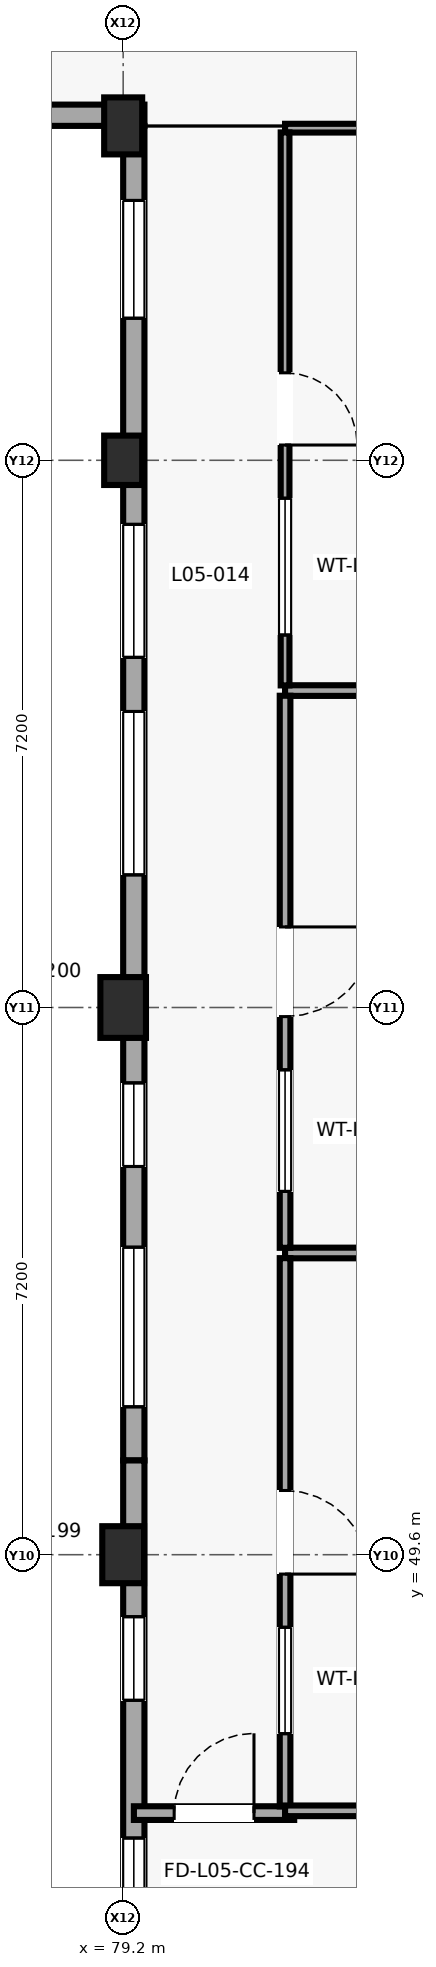
"""IFC4 building model, lengths in metres.
Left out: names, types, materials, properties, quantities, classifications, styles, units other than length and angle.
Written with IfcOpenShell. Run it as: python <this file> out.ifc"""

import sys

from ifc_helpers import new_model, si_unit, direction, frame, frame_2d, origin, origin_2d, place, context, subcontext, project, spatial, polyline, rectangle, outline, extrude, element, fill, save


model = new_model("IFC4")
c1 = context("Model", 3, precision=1e-05, world=origin(), true_north=direction((0.0, 1.0)))
c2 = subcontext(c1, "Body", "Model", "MODEL_VIEW")
j1 = project(units=[si_unit("LENGTHUNIT", "METRE"), si_unit("PLANEANGLEUNIT", "RADIAN")], contexts=[c1])
p1 = place(None, origin())
s1 = spatial("IfcSite", under=j1, at=p1, CompositionType="ELEMENT")
p2 = place(p1, origin())
s2 = spatial("IfcBuilding", under=s1, at=p2, CompositionType="ELEMENT")
p3 = place(p2, frame((0.0, 0.0, 20.2)))
s3 = spatial("IfcBuildingStorey", under=s2, at=p3, CompositionType="ELEMENT", Elevation=20.2)
p4 = place(p3, frame((79.2, 49.6, 0.0), z_axis=(0.0, 0.0, 1.0), x_axis=(1.0, 0.0, 0.0)))
e1 = element("IfcColumn", 1, at=p4, inside=s3, PredefinedType="COLUMN", context=c2, shape_type="SweptSolid", body=[
    extrude(rectangle(XDim=0.55, YDim=0.75, at=origin_2d()), origin(), (0.0, 0.0, 1.0), 4.0),
])
p5 = place(p3, frame((79.2, 56.8, 0.0), z_axis=(0.0, 0.0, 1.0), x_axis=(1.0, 0.0, 0.0)))
e2 = element("IfcColumn", 2, at=p5, inside=s3, PredefinedType="COLUMN", context=c2, shape_type="SweptSolid", body=[
    extrude(rectangle(XDim=0.6, YDim=0.8, at=origin_2d()), origin(), (0.0, 0.0, 1.0), 4.0),
])
p6 = place(p3, frame((79.2, 64.0, 0.0), z_axis=(0.0, 0.0, 1.0), x_axis=(1.0, 0.0, 0.0)))
e3 = element("IfcColumn", 3, at=p6, inside=s3, PredefinedType="COLUMN", context=c2, shape_type="SweptSolid", body=[
    extrude(rectangle(XDim=0.5, YDim=0.65, at=origin_2d()), origin(), (0.0, 0.0, 1.0), 4.0),
])
p7 = place(p3, frame((79.2, 68.4, 0.0), z_axis=(0.0, 0.0, 1.0), x_axis=(1.0, 0.0, 0.0)))
e4 = element("IfcColumn", 4, at=p7, inside=s3, PredefinedType="COLUMN", context=c2, shape_type="SweptSolid", body=[
    extrude(rectangle(XDim=0.5, YDim=0.75, at=origin_2d()), origin(), (0.0, 0.0, 1.0), 4.0),
])
p8 = place(p3, frame((75.6, 68.54, 0.0), z_axis=(0.0, 0.0, 1.0), x_axis=(1.0, 0.0, 0.0)))
e5 = element("IfcWall", 5, at=p8, inside=s3, PredefinedType="SOLIDWALL", context=c2, shape_type="SweptSolid", body=[
    extrude(rectangle(XDim=3.88, YDim=0.28, at=frame_2d((1.94, 0.0))), origin(), (0.0, 0.0, 1.0), 3.78),
])
p9 = place(p8, frame((1.39, 0.0, 0.75)))
e6 = element("IfcOpeningElement", 6, at=p9, cuts=e5, PredefinedType="OPENING", context=c2, shape_type="SweptSolid", body=[
    extrude(rectangle(XDim=1.1, YDim=2.1, at=frame_2d((0.55, 1.05))), frame((0.0, 0.15, 0.0), z_axis=(0.0, -1.0, 0.0), x_axis=(1.0, 0.0, 0.0)), (0.0, 0.0, 1.0), 0.3),
])
p10 = place(p3, frame((79.34, 68.4, 0.0), z_axis=(0.0, 0.0, 1.0), x_axis=(0.0, -1.0, 0.0)))
e7 = element("IfcWall", 7, at=p10, inside=s3, PredefinedType="SOLIDWALL", context=c2, shape_type="SweptSolid", body=[
    extrude(rectangle(XDim=17.56, YDim=0.28, at=frame_2d((8.78, 0.0))), origin(), (0.0, 0.0, 1.0), 3.155),
])
p11 = place(p10, frame((0.981, 0.0, 0.85)))
e8 = element("IfcOpeningElement", 8, at=p11, cuts=e7, PredefinedType="OPENING", context=c2, shape_type="SweptSolid", body=[
    extrude(rectangle(XDim=1.55, YDim=1.85, at=frame_2d((0.775, 0.925))), frame((0.0, 0.15, 0.0), z_axis=(0.0, -1.0, 0.0), x_axis=(1.0, 0.0, 0.0)), (0.0, 0.0, 1.0), 0.3),
])
p12 = place(p10, frame((5.243, 0.0, 0.75)))
e9 = element("IfcOpeningElement", 9, at=p12, cuts=e7, PredefinedType="OPENING", context=c2, shape_type="SweptSolid", body=[
    extrude(rectangle(XDim=1.75, YDim=2.05, at=frame_2d((0.875, 1.025))), frame((0.0, 0.15, 0.0), z_axis=(0.0, -1.0, 0.0), x_axis=(1.0, 0.0, 0.0)), (0.0, 0.0, 1.0), 0.3),
])
p13 = place(p10, frame((7.705, 0.0, 0.85)))
e10 = element("IfcOpeningElement", 10, at=p13, cuts=e7, PredefinedType="OPENING", context=c2, shape_type="SweptSolid", body=[
    extrude(rectangle(XDim=2.15, YDim=1.95, at=frame_2d((1.075, 0.975))), frame((0.0, 0.15, 0.0), z_axis=(0.0, -1.0, 0.0), x_axis=(1.0, 0.0, 0.0)), (0.0, 0.0, 1.0), 0.3),
])
p14 = place(p10, frame((12.592, 0.0, 0.75)))
e11 = element("IfcOpeningElement", 11, at=p14, cuts=e7, PredefinedType="OPENING", context=c2, shape_type="SweptSolid", body=[
    extrude(rectangle(XDim=1.1, YDim=2.1, at=frame_2d((0.55, 1.05))), frame((0.0, 0.15, 0.0), z_axis=(0.0, -1.0, 0.0), x_axis=(1.0, 0.0, 0.0)), (0.0, 0.0, 1.0), 0.3),
])
p15 = place(p10, frame((14.754, 0.0, 0.85)))
e12 = element("IfcOpeningElement", 12, at=p15, cuts=e7, PredefinedType="OPENING", context=c2, shape_type="SweptSolid", body=[
    extrude(rectangle(XDim=2.1, YDim=1.8, at=frame_2d((1.05, 0.9))), frame((0.0, 0.15, 0.0), z_axis=(0.0, -1.0, 0.0), x_axis=(1.0, 0.0, 0.0)), (0.0, 0.0, 1.0), 0.3),
])
p16 = place(p3, frame((79.34, 50.84, 0.0), z_axis=(0.0, 0.0, 1.0), x_axis=(0.0, -1.0, 0.0)))
e13 = element("IfcWall", 13, at=p16, inside=s3, PredefinedType="SOLIDWALL", context=c2, shape_type="SweptSolid", body=[
    extrude(rectangle(XDim=17.56, YDim=0.28, at=frame_2d((8.78, 0.0))), origin(), (0.0, 0.0, 1.0), 3.155),
])
p17 = place(p16, frame((2.056, 0.0, 0.75)))
e14 = element("IfcOpeningElement", 14, at=p17, cuts=e13, PredefinedType="OPENING", context=c2, shape_type="SweptSolid", body=[
    extrude(rectangle(XDim=1.1, YDim=2.1, at=frame_2d((0.55, 1.05))), frame((0.0, 0.15, 0.0), z_axis=(0.0, -1.0, 0.0), x_axis=(1.0, 0.0, 0.0)), (0.0, 0.0, 1.0), 0.3),
])
p18 = place(p16, frame((4.968, 0.0, 0.85)))
e15 = element("IfcOpeningElement", 15, at=p18, cuts=e13, PredefinedType="OPENING", context=c2, shape_type="SweptSolid", body=[
    extrude(rectangle(XDim=1.5, YDim=1.65, at=frame_2d((0.75, 0.825))), frame((0.0, 0.15, 0.0), z_axis=(0.0, -1.0, 0.0), x_axis=(1.0, 0.0, 0.0)), (0.0, 0.0, 1.0), 0.3),
])
p19 = place(p16, frame((7.33, 0.0, 0.85)))
e16 = element("IfcOpeningElement", 16, at=p19, cuts=e13, PredefinedType="OPENING", context=c2, shape_type="SweptSolid", body=[
    extrude(rectangle(XDim=1.2, YDim=1.65, at=frame_2d((0.6, 0.825))), frame((0.0, 0.15, 0.0), z_axis=(0.0, -1.0, 0.0), x_axis=(1.0, 0.0, 0.0)), (0.0, 0.0, 1.0), 0.3),
])
p20 = place(p3, frame((86.799, 68.302, 4.0), z_axis=(0.0, 0.0, 1.0), x_axis=(-1.0, 0.0, 0.0)))
e17 = element("IfcWall", 17, at=p20, inside=s3, PredefinedType="PARAPET", context=c2, shape_type="SweptSolid", body=[
    extrude(rectangle(XDim=7.598, YDim=0.195, at=frame_2d((3.799, 0.0))), origin(), (0.0, 0.0, 1.0), 1.12),
])
p21 = place(p3, frame((79.298, 68.205, 4.0), z_axis=(0.0, 0.0, 1.0), x_axis=(0.0, -1.0, 0.0)))
e18 = element("IfcWall", 18, at=p21, inside=s3, PredefinedType="PARAPET", context=c2, shape_type="SweptSolid", body=[
    extrude(outline(polyline([(0.0, 0.0), (26.01, 0.0), (26.01, 1.12), (17.687, 1.12), (17.637, 1.46), (8.373, 1.46), (8.323, 1.12), (0.0, 1.12), (0.0, 0.0)])), frame((0.0, 0.098, 0.0), z_axis=(0.0, -1.0, 0.0), x_axis=(1.0, 0.0, 0.0)), (0.0, 0.0, 1.0), 0.195),
])
p22 = place(p3, frame((75.6, 68.498, 4.0), z_axis=(0.0, 0.0, 1.0), x_axis=(1.0, 0.0, 0.0)))
e19 = element("IfcWall", 19, at=p22, inside=s3, PredefinedType="PARAPET", context=c2, shape_type="SweptSolid", body=[
    extrude(outline(polyline([(0.0, 0.0), (39.999, 0.0), (39.999, 1.12), (27.199, 1.12), (27.149, 1.46), (12.85, 1.46), (12.8, 1.12), (0.0, 1.12), (0.0, 0.0)])), frame((0.0, 0.098, 0.0), z_axis=(0.0, -1.0, 0.0), x_axis=(1.0, 0.0, 0.0)), (0.0, 0.0, 1.0), 0.195),
])
p23 = place(p3, frame((79.341, 46.2, 0.0), z_axis=(0.0, 0.0, 1.0), x_axis=(1.0, 0.0, 0.0)))
e20 = element("IfcWall", 20, at=p23, inside=s3, PredefinedType="PARTITIONING", context=c2, shape_type="SweptSolid", body=[
    extrude(rectangle(XDim=2.109, YDim=0.18, at=frame_2d((1.054, 0.0))), origin(), (0.0, 0.0, 1.0), 3.78),
])
p24 = place(p23, frame((0.53, 0.0, 0.0)))
e21 = element("IfcOpeningElement", 21, at=p24, cuts=e20, PredefinedType="OPENING", context=c2, shape_type="SweptSolid", body=[
    extrude(rectangle(XDim=1.05, YDim=2.15, at=frame_2d((0.525, 1.075))), frame((0.0, 0.1, 0.0), z_axis=(0.0, -1.0, 0.0), x_axis=(1.0, 0.0, 0.0)), (0.0, 0.0, 1.0), 0.2),
])
p25 = place(p3, frame((86.522, 53.57, 0.0), z_axis=(0.0, 0.0, 1.0), x_axis=(-1.0, 0.0, 0.0)))
e22 = element("IfcWall", 22, at=p25, inside=s3, PredefinedType="PARTITIONING", context=c2, shape_type="SweptSolid", body=[
    extrude(rectangle(XDim=5.192, YDim=0.14, at=frame_2d((2.596, 0.0))), origin(), (0.0, 0.0, 1.0), 3.755),
])
p26 = place(p3, frame((81.33, 53.502, 0.0), z_axis=(0.0, 0.0, 1.0), x_axis=(0.0, -1.0, 0.0)))
e23 = element("IfcWall", 23, at=p26, inside=s3, PredefinedType="PARTITIONING", context=c2, shape_type="SweptSolid", body=[
    extrude(rectangle(XDim=7.214, YDim=0.14, at=frame_2d((3.607, 0.0))), origin(), (0.0, 0.0, 1.0), 3.755),
])
p27 = place(p26, frame((3.057, 0.0, 0.0)))
e24 = element("IfcOpeningElement", 24, at=p27, cuts=e23, PredefinedType="OPENING", context=c2, shape_type="SweptSolid", body=[
    extrude(rectangle(XDim=1.1, YDim=2.1, at=frame_2d((0.55, 1.05))), frame((0.0, 0.08, 0.0), z_axis=(0.0, -1.0, 0.0), x_axis=(1.0, 0.0, 0.0)), (0.0, 0.0, 1.0), 0.16),
])
p28 = place(p26, frame((4.857, 0.0, 1.05)))
e25 = element("IfcOpeningElement", 25, at=p28, cuts=e23, PredefinedType="OPENING", context=c2, shape_type="SweptSolid", body=[
    extrude(rectangle(XDim=1.4, YDim=1.05, at=frame_2d((0.7, 0.525))), frame((0.0, 0.08, 0.0), z_axis=(0.0, -1.0, 0.0), x_axis=(1.0, 0.0, 0.0)), (0.0, 0.0, 1.0), 0.16),
])
for number, where, z_axis, x_axis in (
    (26, (81.33, 46.23, 0.0), (0.0, 0.0, 1.0), (1.0, 0.0, 0.0)),
    (27, (86.522, 60.97, 0.0), (0.0, 0.0, 1.0), (-1.0, 0.0, 0.0)),
):
    element("IfcWall", number, at=place(p3, frame(where, z_axis=z_axis, x_axis=x_axis)), inside=s3, PredefinedType="PARTITIONING", context=c2, shape_type="SweptSolid", body=[
        extrude(rectangle(XDim=5.192, YDim=0.14, at=frame_2d((2.596, 0.0))), origin(), (0.0, 0.0, 1.0), 3.755),
    ])
p29 = place(p3, frame((81.33, 60.902, 0.0), z_axis=(0.0, 0.0, 1.0), x_axis=(0.0, -1.0, 0.0)))
e28 = element("IfcWall", 28, at=p29, inside=s3, PredefinedType="PARTITIONING", context=c2, shape_type="SweptSolid", body=[
    extrude(rectangle(XDim=7.264, YDim=0.14, at=frame_2d((3.632, 0.0))), origin(), (0.0, 0.0, 1.0), 3.755),
])
p30 = place(p29, frame((3.042, 0.0, 0.0)))
e29 = element("IfcOpeningElement", 29, at=p30, cuts=e28, PredefinedType="OPENING", context=c2, shape_type="SweptSolid", body=[
    extrude(rectangle(XDim=1.18, YDim=2.2, at=frame_2d((0.59, 1.1))), frame((0.0, 0.08, 0.0), z_axis=(0.0, -1.0, 0.0), x_axis=(1.0, 0.0, 0.0)), (0.0, 0.0, 1.0), 0.16),
])
p31 = place(p29, frame((4.922, 0.0, 1.05)))
e30 = element("IfcOpeningElement", 30, at=p31, cuts=e28, PredefinedType="OPENING", context=c2, shape_type="SweptSolid", body=[
    extrude(rectangle(XDim=1.6, YDim=1.1, at=frame_2d((0.8, 0.55))), frame((0.0, 0.08, 0.0), z_axis=(0.0, -1.0, 0.0), x_axis=(1.0, 0.0, 0.0)), (0.0, 0.0, 1.0), 0.16),
])
p32 = place(p3, frame((86.522, 68.37, 0.0), z_axis=(0.0, 0.0, 1.0), x_axis=(-1.0, 0.0, 0.0)))
e31 = element("IfcWall", 31, at=p32, inside=s3, PredefinedType="PARTITIONING", context=c2, shape_type="SweptSolid", body=[
    extrude(rectangle(XDim=5.192, YDim=0.115, at=frame_2d((2.596, 0.0))), origin(), (0.0, 0.0, 1.0), 3.055),
])
p33 = place(p3, frame((81.33, 68.314, 0.0), z_axis=(0.0, 0.0, 1.0), x_axis=(0.0, -1.0, 0.0)))
e32 = element("IfcWall", 32, at=p33, inside=s3, PredefinedType="PARTITIONING", context=c2, shape_type="SweptSolid", body=[
    extrude(rectangle(XDim=7.276, YDim=0.115, at=frame_2d((3.638, 0.0))), origin(), (0.0, 0.0, 1.0), 3.755),
])
p34 = place(p33, frame((3.163, 0.0, 0.0)))
e33 = element("IfcOpeningElement", 33, at=p34, cuts=e32, PredefinedType="OPENING", context=c2, shape_type="SweptSolid", body=[
    extrude(rectangle(XDim=0.95, YDim=2.05, at=frame_2d((0.475, 1.025))), frame((0.0, 0.067, 0.0), z_axis=(0.0, -1.0, 0.0), x_axis=(1.0, 0.0, 0.0)), (0.0, 0.0, 1.0), 0.135),
])
p35 = place(p33, frame((4.813, 0.0, 1.05)))
e34 = element("IfcOpeningElement", 34, at=p35, cuts=e32, PredefinedType="OPENING", context=c2, shape_type="SweptSolid", body=[
    extrude(rectangle(XDim=1.8, YDim=1.2, at=frame_2d((0.9, 0.6))), frame((0.0, 0.067, 0.0), z_axis=(0.0, -1.0, 0.0), x_axis=(1.0, 0.0, 0.0)), (0.0, 0.0, 1.0), 0.135),
])
p36 = place(p11, origin())
e35 = element("IfcWindow", 35, at=p36, inside=s3, PartitioningType="SINGLE_PANEL", PredefinedType="WINDOW", context=c2, shape_type="SweptSolid", body=[
    extrude(rectangle(XDim=1.55, YDim=1.85, at=frame_2d((0.775, 0.925))), frame((0.0, 0.03, 0.0), z_axis=(0.0, -1.0, 0.0), x_axis=(1.0, 0.0, 0.0)), (0.0, 0.0, 1.0), 0.06),
])
fill(e8, e35)
p37 = place(p12, origin())
e36 = element("IfcWindow", 36, at=p37, inside=s3, PartitioningType="SINGLE_PANEL", PredefinedType="WINDOW", context=c2, shape_type="SweptSolid", body=[
    extrude(rectangle(XDim=1.75, YDim=2.05, at=frame_2d((0.875, 1.025))), frame((0.0, 0.03, 0.0), z_axis=(0.0, -1.0, 0.0), x_axis=(1.0, 0.0, 0.0)), (0.0, 0.0, 1.0), 0.06),
])
fill(e9, e36)
p38 = place(p13, origin())
e37 = element("IfcWindow", 37, at=p38, inside=s3, PartitioningType="SINGLE_PANEL", PredefinedType="WINDOW", context=c2, shape_type="SweptSolid", body=[
    extrude(rectangle(XDim=2.15, YDim=1.95, at=frame_2d((1.075, 0.975))), frame((0.0, 0.03, 0.0), z_axis=(0.0, -1.0, 0.0), x_axis=(1.0, 0.0, 0.0)), (0.0, 0.0, 1.0), 0.06),
])
fill(e10, e37)
p39 = place(p14, origin())
e38 = element("IfcWindow", 38, at=p39, inside=s3, PartitioningType="SINGLE_PANEL", PredefinedType="WINDOW", context=c2, shape_type="SweptSolid", body=[
    extrude(rectangle(XDim=1.1, YDim=2.1, at=frame_2d((0.55, 1.05))), frame((0.0, 0.03, 0.0), z_axis=(0.0, -1.0, 0.0), x_axis=(1.0, 0.0, 0.0)), (0.0, 0.0, 1.0), 0.06),
])
fill(e11, e38)
p40 = place(p15, origin())
e39 = element("IfcWindow", 39, at=p40, inside=s3, PartitioningType="SINGLE_PANEL", PredefinedType="WINDOW", context=c2, shape_type="SweptSolid", body=[
    extrude(rectangle(XDim=2.1, YDim=1.8, at=frame_2d((1.05, 0.9))), frame((0.0, 0.03, 0.0), z_axis=(0.0, -1.0, 0.0), x_axis=(1.0, 0.0, 0.0)), (0.0, 0.0, 1.0), 0.06),
])
fill(e12, e39)
p41 = place(p17, origin())
e40 = element("IfcWindow", 40, at=p41, inside=s3, PartitioningType="SINGLE_PANEL", PredefinedType="WINDOW", context=c2, shape_type="SweptSolid", body=[
    extrude(rectangle(XDim=1.1, YDim=2.1, at=frame_2d((0.55, 1.05))), frame((0.0, 0.03, 0.0), z_axis=(0.0, -1.0, 0.0), x_axis=(1.0, 0.0, 0.0)), (0.0, 0.0, 1.0), 0.06),
])
fill(e14, e40)
p42 = place(p18, origin())
e41 = element("IfcWindow", 41, at=p42, inside=s3, PartitioningType="SINGLE_PANEL", PredefinedType="WINDOW", context=c2, shape_type="SweptSolid", body=[
    extrude(rectangle(XDim=1.5, YDim=1.65, at=frame_2d((0.75, 0.825))), frame((0.0, 0.03, 0.0), z_axis=(0.0, -1.0, 0.0), x_axis=(1.0, 0.0, 0.0)), (0.0, 0.0, 1.0), 0.06),
])
fill(e15, e41)
p43 = place(p24, origin())
e42 = element("IfcDoor", 42, at=p43, inside=s3, OperationType="SINGLE_SWING_RIGHT", PredefinedType="DOOR", context=c2, shape_type="SweptSolid", body=[
    extrude(rectangle(XDim=1.05, YDim=2.15, at=frame_2d((0.525, 1.075))), frame((0.0, 0.025, 0.0), z_axis=(0.0, -1.0, 0.0), x_axis=(1.0, 0.0, 0.0)), (0.0, 0.0, 1.0), 0.05),
])
fill(e21, e42)
p44 = place(p27, origin())
e43 = element("IfcDoor", 43, at=p44, inside=s3, OperationType="SINGLE_SWING_RIGHT", PredefinedType="DOOR", context=c2, shape_type="SweptSolid", body=[
    extrude(rectangle(XDim=1.1, YDim=2.1, at=frame_2d((0.55, 1.05))), frame((0.0, 0.025, 0.0), z_axis=(0.0, -1.0, 0.0), x_axis=(1.0, 0.0, 0.0)), (0.0, 0.0, 1.0), 0.05),
])
fill(e24, e43)
p45 = place(p28, origin())
e44 = element("IfcWindow", 44, at=p45, inside=s3, PartitioningType="SINGLE_PANEL", PredefinedType="WINDOW", context=c2, shape_type="SweptSolid", body=[
    extrude(rectangle(XDim=1.4, YDim=1.05, at=frame_2d((0.7, 0.525))), frame((0.0, 0.03, 0.0), z_axis=(0.0, -1.0, 0.0), x_axis=(1.0, 0.0, 0.0)), (0.0, 0.0, 1.0), 0.06),
])
fill(e25, e44)
p46 = place(p30, origin())
e45 = element("IfcDoor", 45, at=p46, inside=s3, OperationType="SINGLE_SWING_LEFT", PredefinedType="DOOR", context=c2, shape_type="SweptSolid", body=[
    extrude(rectangle(XDim=1.18, YDim=2.2, at=frame_2d((0.59, 1.1))), frame((0.0, 0.025, 0.0), z_axis=(0.0, -1.0, 0.0), x_axis=(1.0, 0.0, 0.0)), (0.0, 0.0, 1.0), 0.05),
])
fill(e29, e45)
p47 = place(p31, origin())
e46 = element("IfcWindow", 46, at=p47, inside=s3, PartitioningType="SINGLE_PANEL", PredefinedType="WINDOW", context=c2, shape_type="SweptSolid", body=[
    extrude(rectangle(XDim=1.6, YDim=1.1, at=frame_2d((0.8, 0.55))), frame((0.0, 0.03, 0.0), z_axis=(0.0, -1.0, 0.0), x_axis=(1.0, 0.0, 0.0)), (0.0, 0.0, 1.0), 0.06),
])
fill(e30, e46)
p48 = place(p34, origin())
e47 = element("IfcDoor", 47, at=p48, inside=s3, OperationType="SINGLE_SWING_RIGHT", PredefinedType="DOOR", context=c2, shape_type="SweptSolid", body=[
    extrude(rectangle(XDim=0.95, YDim=2.05, at=frame_2d((0.475, 1.025))), frame((0.0, 0.025, 0.0), z_axis=(0.0, -1.0, 0.0), x_axis=(1.0, 0.0, 0.0)), (0.0, 0.0, 1.0), 0.05),
])
fill(e33, e47)
p49 = place(p35, origin())
e48 = element("IfcWindow", 48, at=p49, inside=s3, PartitioningType="SINGLE_PANEL", PredefinedType="WINDOW", context=c2, shape_type="SweptSolid", body=[
    extrude(rectangle(XDim=1.8, YDim=1.2, at=frame_2d((0.9, 0.6))), frame((0.0, 0.03, 0.0), z_axis=(0.0, -1.0, 0.0), x_axis=(1.0, 0.0, 0.0)), (0.0, 0.0, 1.0), 0.06),
])
fill(e34, e48)
save(model, sys.argv[1])
